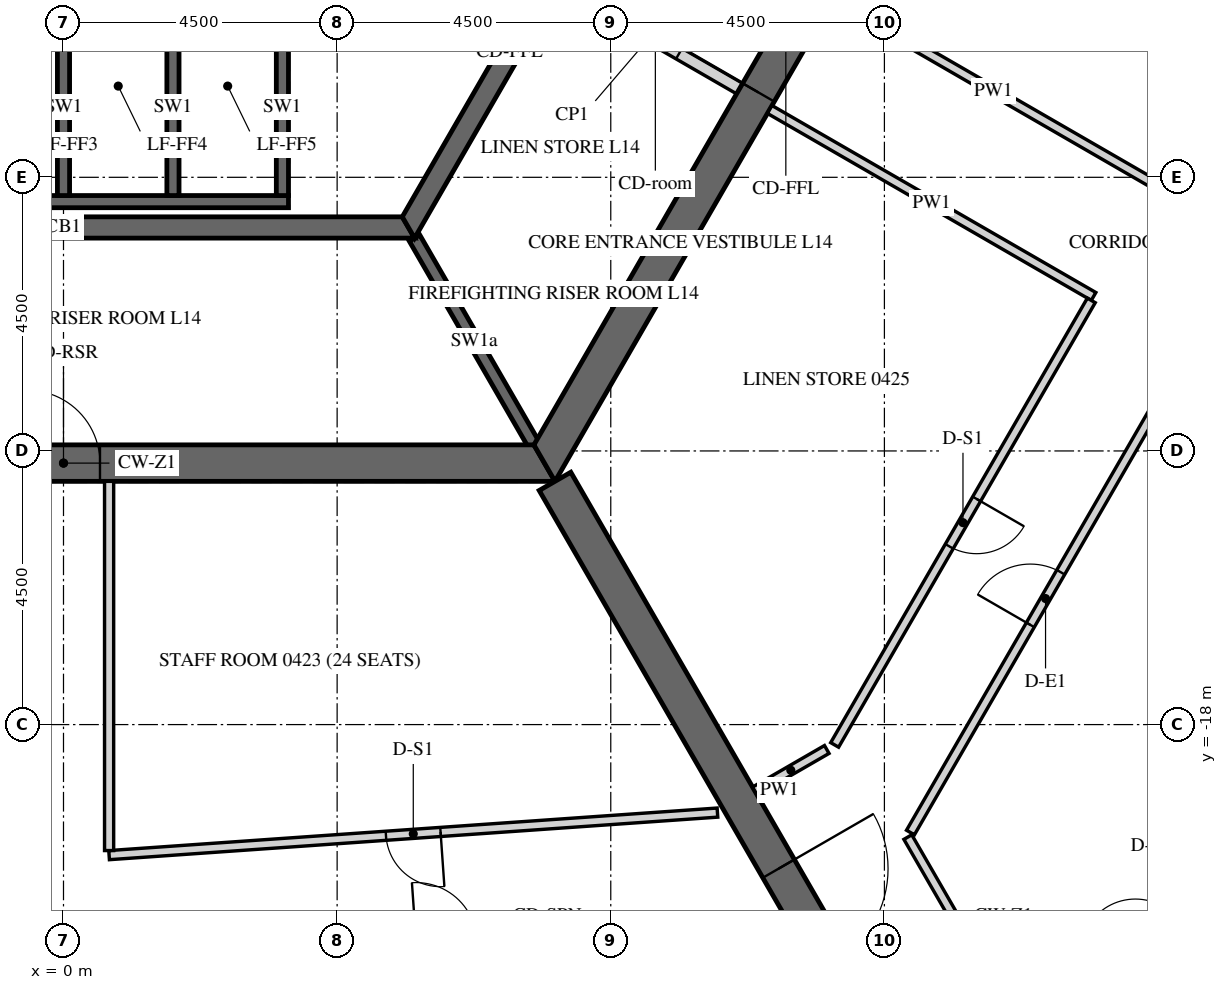
"""IFC4 building model, lengths in metres.
Left out: names, types, materials, properties, quantities, classifications, styles, units other than length and angle.
Written with IfcOpenShell. Run it as: python <this file> out.ifc"""

import sys

from ifc_helpers import new_model, si_unit, direction, frame, frame_2d, origin, place, context, subcontext, project, spatial, polyline, rectangle, outline, extrude, element, fill, save


model = new_model("IFC4")
c1 = context("Model", 3, precision=1e-05, world=origin(), true_north=direction((0.0, 1.0)))
c2 = subcontext(c1, "Body", "Model", "MODEL_VIEW")
j1 = project(units=[si_unit("LENGTHUNIT", "METRE"), si_unit("PLANEANGLEUNIT", "RADIAN")], contexts=[c1])
p1 = place(None, origin())
s1 = spatial("IfcSite", under=j1, at=p1, CompositionType="ELEMENT")
p2 = place(p1, origin())
s2 = spatial("IfcBuilding", under=s1, at=p2, CompositionType="ELEMENT")
p3 = place(p2, frame((0.0, 0.0, 68.7)))
s3 = spatial("IfcBuildingStorey", under=s2, at=p3, CompositionType="ELEMENT", Elevation=68.7)
p4 = place(p3, frame((-7.91, -13.7, -0.15), z_axis=(0.0, 0.0, 1.0), x_axis=(1.0, 0.0, 0.0)))
e1 = element("IfcWall", 1, at=p4, inside=s3, PredefinedType="SHEAR", context=c2, shape_type="SweptSolid", body=[
    extrude(outline(polyline([(-0.173, -0.3), (15.993, -0.3), (15.646, 0.3), (0.173, 0.3), (-0.173, -0.3)])), origin(), (0.0, 0.0, 1.0), 3.9),
])
p5 = place(p4, frame((7.31, 0.0, 0.15)))
e2 = element("IfcOpeningElement", 2, at=p5, cuts=e1, PredefinedType="OPENING", context=c2, shape_type="SweptSolid", body=[
    extrude(rectangle(XDim=1.2, YDim=2.4, at=frame_2d((0.6, 1.2))), frame((0.0, 0.31, 0.0), z_axis=(0.0, -1.0, 0.0), x_axis=(1.0, 0.0, 0.0)), (0.0, 0.0, 1.0), 0.62),
])
p6 = place(p3, frame((7.91, -13.7, -0.15), z_axis=(0.0, 0.0, 1.0), x_axis=(0.499999880136, 0.866025472988, 0.0)))
e3 = element("IfcWall", 3, at=p6, inside=s3, PredefinedType="SHEAR", context=c2, shape_type="SweptSolid", body=[
    extrude(outline(polyline([(-0.173, -0.3), (15.993, -0.3), (15.646, 0.3), (0.173, 0.3), (-0.173, -0.3)])), origin(), (0.0, 0.0, 1.0), 3.9),
])
p7 = place(p6, frame((7.039, 0.0, 0.15)))
e4 = element("IfcOpeningElement", 4, at=p7, cuts=e3, PredefinedType="OPENING", context=c2, shape_type="SweptSolid", body=[
    extrude(rectangle(XDim=1.8, YDim=2.4, at=frame_2d((0.9, 1.2))), frame((0.0, 0.31, 0.0), z_axis=(0.0, -1.0, 0.0), x_axis=(1.0, 0.0, 0.0)), (0.0, 0.0, 1.0), 0.62),
])
p8 = place(p3, frame((8.083, -14.0, -0.15), z_axis=(0.0, 0.0, 1.0), x_axis=(0.499997680643, -0.866026742862, 0.0)))
e5 = element("IfcWall", 5, at=p8, inside=s3, PredefinedType="SHEAR", context=c2, shape_type="SweptSolid", body=[
    extrude(rectangle(XDim=16.509, YDim=0.6, at=frame_2d((8.254, 0.0))), origin(), (0.0, 0.0, 1.0), 3.9),
])
p9 = place(p8, frame((7.354, 0.0, 0.15)))
e6 = element("IfcOpeningElement", 6, at=p9, cuts=e5, PredefinedType="OPENING", context=c2, shape_type="SweptSolid", body=[
    extrude(rectangle(XDim=1.8, YDim=2.4, at=frame_2d((0.9, 1.2))), frame((0.0, 0.31, 0.0), z_axis=(0.0, -1.0, 0.0), x_axis=(1.0, 0.0, 0.0)), (0.0, 0.0, 1.0), 0.62),
])
p10 = place(p3, frame((-5.673, -9.825, -0.15), z_axis=(0.0, 0.0, 1.0), x_axis=(1.0, 0.0, 0.0)))
e7 = element("IfcWall", 7, at=p10, inside=s3, PredefinedType="SHEAR", context=c2, shape_type="SweptSolid", body=[
    extrude(outline(polyline([(-0.101, -0.175), (11.446, -0.175), (11.244, 0.175), (0.101, 0.175), (-0.101, -0.175)])), origin(), (0.0, 0.0, 1.0), 3.9),
])
p11 = place(p3, frame((5.673, -9.825, -0.15), z_axis=(0.0, 0.0, 1.0), x_axis=(0.499995046907, 0.866028263435, 0.0)))
e8 = element("IfcWall", 8, at=p11, inside=s3, PredefinedType="SHEAR", context=c2, shape_type="SweptSolid", body=[
    extrude(outline(polyline([(-0.101, -0.175), (11.446, -0.175), (11.244, 0.175), (0.101, 0.175), (-0.101, -0.175)])), origin(), (0.0, 0.0, 1.0), 3.9),
])
p12 = place(p11, frame((4.801, 0.0, 0.15)))
e9 = element("IfcOpeningElement", 9, at=p12, cuts=e8, PredefinedType="OPENING", context=c2, shape_type="SweptSolid", body=[
    extrude(rectangle(XDim=1.8, YDim=2.4, at=frame_2d((0.9, 1.2))), frame((0.0, 0.185, 0.0), z_axis=(0.0, -1.0, 0.0), x_axis=(1.0, 0.0, 0.0)), (0.0, 0.0, 1.0), 0.37),
])
p13 = place(p3, frame((-5.5, -9.4, -0.25), z_axis=(0.0, 0.0, 1.0), x_axis=(1.0, 0.0, 0.0)))
e10 = element("IfcWall", 10, at=p13, inside=s3, PredefinedType="SHEAR", context=c2, shape_type="SweptSolid", body=[
    extrude(rectangle(XDim=9.2, YDim=0.2, at=frame_2d((4.6, 0.0))), origin(), (0.0, 0.0, 1.0), 3.9),
])
for number, where, z_axis, x_axis in (
    (11, (0.0, -9.3, -0.25), (0.0, 0.0, 1.0), (0.0, 1.0, 0.0)),
    (12, (1.8, -9.3, -0.25), (0.0, 0.0, 1.0), (0.0, 1.0, 0.0)),
    (13, (3.6, -9.3, -0.25), (0.0, 0.0, 1.0), (0.0, 1.0, 0.0)),
):
    element("IfcWall", number, at=place(p3, frame(where, z_axis=z_axis, x_axis=x_axis)), inside=s3, PredefinedType="SHEAR", context=c2, shape_type="SweptSolid", body=[
        extrude(rectangle(XDim=2.9, YDim=0.2, at=frame_2d((1.45, 0.0))), origin(), (0.0, 0.0, 1.0), 3.9),
    ])
p14 = place(p3, frame((5.773, -10.0, -0.15), z_axis=(0.0, 0.0, 1.0), x_axis=(0.500038251005, -0.86600331843, 0.0)))
e14 = element("IfcWall", 14, at=p14, inside=s3, PredefinedType="SHEAR", context=c2, shape_type="SweptSolid", body=[
    extrude(rectangle(XDim=3.926, YDim=0.2, at=frame_2d((1.963, 0.0))), origin(), (0.0, 0.0, 1.0), 3.9),
])
p15 = place(p3, frame((8.175, -5.841, 0.0), z_axis=(0.0, 0.0, 1.0), x_axis=(0.866020560687, -0.500008388397, 0.0)))
e15 = element("IfcWall", 15, at=p15, inside=s3, PredefinedType="PARTITIONING", context=c2, shape_type="SweptSolid", body=[
    extrude(rectangle(XDim=3.4, YDim=0.2, at=frame_2d((1.7, 0.0))), origin(), (0.0, 0.0, 1.0), 3.65),
])
p16 = place(p15, frame((1.35, 0.0, 0.0)))
e16 = element("IfcOpeningElement", 16, at=p16, cuts=e15, PredefinedType="OPENING", context=c2, shape_type="SweptSolid", body=[
    extrude(rectangle(XDim=0.9, YDim=2.1, at=frame_2d((0.45, 1.05))), frame((0.0, 0.11, 0.0), z_axis=(0.0, -1.0, 0.0), x_axis=(1.0, 0.0, 0.0)), (0.0, 0.0, 1.0), 0.22),
])
p17 = place(p3, frame((10.754, -19.447, 0.0), z_axis=(0.0, 0.0, 1.0), x_axis=(-0.997564830966, -0.069745308232, 0.0)))
e17 = element("IfcWall", 17, at=p17, inside=s3, PredefinedType="PARTITIONING", context=c2, shape_type="SweptSolid", body=[
    extrude(rectangle(XDim=10.029, YDim=0.15, at=frame_2d((5.014, 0.0))), origin(), (0.0, 0.0, 1.0), 2.988),
])
p18 = place(p17, frame((4.564, 0.0, 0.0)))
e18 = element("IfcOpeningElement", 18, at=p18, cuts=e17, PredefinedType="OPENING", context=c2, shape_type="SweptSolid", body=[
    extrude(rectangle(XDim=0.9, YDim=2.1, at=frame_2d((0.45, 1.05))), frame((0.0, 0.085, 0.0), z_axis=(0.0, -1.0, 0.0), x_axis=(1.0, 0.0, 0.0)), (0.0, 0.0, 1.0), 0.17),
])
p19 = place(p3, frame((0.75, -20.072, 0.0), z_axis=(0.0, 0.0, 1.0), x_axis=(0.0, 1.0, 0.0)))
e19 = element("IfcWall", 19, at=p19, inside=s3, PredefinedType="PARTITIONING", context=c2, shape_type="SweptSolid", body=[
    extrude(rectangle(XDim=6.072, YDim=0.15, at=frame_2d((3.036, 0.0))), origin(), (0.0, 0.0, 1.0), 2.988),
])
p20 = place(p3, frame((15.441, -22.545, 0.0), z_axis=(0.0, 0.0, 1.0), x_axis=(-0.500037089193, 0.86600398927, 0.0)))
e20 = element("IfcWall", 20, at=p20, inside=s3, PredefinedType="PARTITIONING", context=c2, shape_type="SweptSolid", body=[
    extrude(rectangle(XDim=3.112, YDim=0.15, at=frame_2d((1.556, 0.0))), origin(), (0.0, 0.0, 1.0), 2.988),
])
p21 = place(p3, frame((13.928, -19.775, 0.0), z_axis=(0.0, 0.0, 1.0), x_axis=(0.50000450071, 0.866022805283, 0.0)))
e21 = element("IfcWall", 21, at=p21, inside=s3, PredefinedType="PARTITIONING", context=c2, shape_type="SweptSolid", body=[
    extrude(rectangle(XDim=23.877, YDim=0.15, at=frame_2d((11.938, 0.0))), origin(), (0.0, 0.0, 1.0), 2.988),
])
p22 = place(p21, frame((3.943, 0.0, 0.0)))
e22 = element("IfcOpeningElement", 22, at=p22, cuts=e21, PredefinedType="OPENING", context=c2, shape_type="SweptSolid", body=[
    extrude(rectangle(XDim=1.0, YDim=2.1, at=frame_2d((0.5, 1.05))), frame((0.0, 0.085, 0.0), z_axis=(0.0, -1.0, 0.0), x_axis=(1.0, 0.0, 0.0)), (0.0, 0.0, 1.0), 0.17),
])
p23 = place(p21, frame((14.972, 0.0, 0.0)))
e23 = element("IfcOpeningElement", 23, at=p23, cuts=e21, PredefinedType="OPENING", context=c2, shape_type="SweptSolid", body=[
    extrude(rectangle(XDim=1.0, YDim=2.1, at=frame_2d((0.5, 1.05))), frame((0.0, 0.085, 0.0), z_axis=(0.0, -1.0, 0.0), x_axis=(1.0, 0.0, 0.0)), (0.0, 0.0, 1.0), 0.17),
])
p24 = place(p3, frame((17.925, -9.103, 0.0), z_axis=(0.0, 0.0, 1.0), x_axis=(-0.866013586754, 0.500020467139, 0.0)))
e24 = element("IfcWall", 24, at=p24, inside=s3, PredefinedType="PARTITIONING", context=c2, shape_type="SweptSolid", body=[
    extrude(rectangle(XDim=6.075, YDim=0.15, at=frame_2d((3.038, 0.0))), origin(), (0.0, 0.0, 1.0), 2.988),
])
p25 = place(p3, frame((11.614, -7.884, 0.0), z_axis=(0.0, 0.0, 1.0), x_axis=(0.866033542371, -0.499985903289, 0.0)))
e25 = element("IfcWall", 25, at=p25, inside=s3, PredefinedType="PARTITIONING", context=c2, shape_type="SweptSolid", body=[
    extrude(rectangle(XDim=6.15, YDim=0.15, at=frame_2d((3.075, 0.0))), origin(), (0.0, 0.0, 1.0), 2.988),
])
p26 = place(p3, frame((16.902, -11.024, 0.0), z_axis=(0.0, 0.0, 1.0), x_axis=(-0.499999527968, -0.866025676312, 0.0)))
e26 = element("IfcWall", 26, at=p26, inside=s3, PredefinedType="PARTITIONING", context=c2, shape_type="SweptSolid", body=[
    extrude(rectangle(XDim=8.441, YDim=0.15, at=frame_2d((4.22, 0.0))), origin(), (0.0, 0.0, 1.0), 2.988),
])
p27 = place(p26, frame((3.771, 0.0, 0.0)))
e27 = element("IfcOpeningElement", 27, at=p27, cuts=e26, PredefinedType="OPENING", context=c2, shape_type="SweptSolid", body=[
    extrude(rectangle(XDim=0.9, YDim=2.1, at=frame_2d((0.45, 1.05))), frame((0.0, 0.085, 0.0), z_axis=(0.0, -1.0, 0.0), x_axis=(1.0, 0.0, 0.0)), (0.0, 0.0, 1.0), 0.17),
])
p28 = place(p3, frame((12.552, -18.409, 0.0), z_axis=(0.0, 0.0, 1.0), x_axis=(-0.866078408764, -0.499908181442, 0.0)))
e28 = element("IfcWall", 28, at=p28, inside=s3, PredefinedType="PARTITIONING", context=c2, shape_type="SweptSolid", body=[
    extrude(rectangle(XDim=1.365, YDim=0.15, at=frame_2d((0.683, 0.0))), origin(), (0.0, 0.0, 1.0), 2.988),
])
p29 = place(p3, frame((15.271, -25.85, 0.0), z_axis=(0.0, 0.0, 1.0), x_axis=(0.499983733712, 0.866034794927, 0.0)))
e29 = element("IfcWall", 29, at=p29, inside=s3, PredefinedType="PARTITIONING", context=c2, shape_type="SweptSolid", body=[
    extrude(rectangle(XDim=8.762, YDim=0.1, at=frame_2d((4.381, 0.0))), origin(), (0.0, 0.0, 1.0), 2.988),
])
p30 = place(p29, frame((4.712, 0.0, 0.0)))
e30 = element("IfcOpeningElement", 30, at=p30, cuts=e29, PredefinedType="OPENING", context=c2, shape_type="SweptSolid", body=[
    extrude(rectangle(XDim=0.9, YDim=2.1, at=frame_2d((0.45, 1.05))), frame((0.0, 0.06, 0.0), z_axis=(0.0, -1.0, 0.0), x_axis=(1.0, 0.0, 0.0)), (0.0, 0.0, 1.0), 0.12),
])
p31 = place(p7, origin())
e31 = element("IfcDoor", 31, at=p31, inside=s3, OperationType="DOUBLE_DOOR_SINGLE_SWING", PredefinedType="DOOR", context=c2, shape_type="SweptSolid", body=[
    extrude(rectangle(XDim=1.8, YDim=2.4, at=frame_2d((0.9, 1.2))), frame((0.0, 0.025, 0.0), z_axis=(0.0, -1.0, 0.0), x_axis=(1.0, 0.0, 0.0)), (0.0, 0.0, 1.0), 0.05),
])
fill(e4, e31)
p32 = place(p5, origin())
e32 = element("IfcDoor", 32, at=p32, inside=s3, OperationType="SINGLE_SWING_LEFT", PredefinedType="DOOR", context=c2, shape_type="SweptSolid", body=[
    extrude(rectangle(XDim=1.2, YDim=2.4, at=frame_2d((0.6, 1.2))), frame((0.0, 0.025, 0.0), z_axis=(0.0, -1.0, 0.0), x_axis=(1.0, 0.0, 0.0)), (0.0, 0.0, 1.0), 0.05),
])
fill(e2, e32)
p33 = place(p9, origin())
e33 = element("IfcDoor", 33, at=p33, inside=s3, OperationType="DOUBLE_DOOR_SINGLE_SWING", PredefinedType="DOOR", context=c2, shape_type="SweptSolid", body=[
    extrude(rectangle(XDim=1.8, YDim=2.4, at=frame_2d((0.9, 1.2))), frame((0.0, 0.025, 0.0), z_axis=(0.0, -1.0, 0.0), x_axis=(1.0, 0.0, 0.0)), (0.0, 0.0, 1.0), 0.05),
])
fill(e6, e33)
p34 = place(p16, origin())
e34 = element("IfcDoor", 34, at=p34, inside=s3, OperationType="SINGLE_SWING_LEFT", PredefinedType="DOOR", context=c2, shape_type="SweptSolid", body=[
    extrude(rectangle(XDim=0.9, YDim=2.1, at=frame_2d((0.45, 1.05))), frame((0.0, 0.025, 0.0), z_axis=(0.0, -1.0, 0.0), x_axis=(1.0, 0.0, 0.0)), (0.0, 0.0, 1.0), 0.05),
])
fill(e16, e34)
p35 = place(p22, origin())
e35 = element("IfcDoor", 35, at=p35, inside=s3, OperationType="SINGLE_SWING_RIGHT", PredefinedType="DOOR", context=c2, shape_type="SweptSolid", body=[
    extrude(rectangle(XDim=1.0, YDim=2.1, at=frame_2d((0.5, 1.05))), frame((0.0, 0.025, 0.0), z_axis=(0.0, -1.0, 0.0), x_axis=(1.0, 0.0, 0.0)), (0.0, 0.0, 1.0), 0.05),
])
fill(e22, e35)
p36 = place(p30, origin())
e36 = element("IfcDoor", 36, at=p36, inside=s3, OperationType="SINGLE_SWING_LEFT", PredefinedType="DOOR", context=c2, shape_type="SweptSolid", body=[
    extrude(rectangle(XDim=0.9, YDim=2.1, at=frame_2d((0.45, 1.05))), frame((0.0, 0.025, 0.0), z_axis=(0.0, -1.0, 0.0), x_axis=(1.0, 0.0, 0.0)), (0.0, 0.0, 1.0), 0.05),
])
fill(e30, e36)
p37 = place(p18, origin())
e37 = element("IfcDoor", 37, at=p37, inside=s3, OperationType="SINGLE_SWING_LEFT", PredefinedType="DOOR", context=c2, shape_type="SweptSolid", body=[
    extrude(rectangle(XDim=0.9, YDim=2.1, at=frame_2d((0.45, 1.05))), frame((0.0, 0.025, 0.0), z_axis=(0.0, -1.0, 0.0), x_axis=(1.0, 0.0, 0.0)), (0.0, 0.0, 1.0), 0.05),
])
fill(e18, e37)
p38 = place(p27, origin())
e38 = element("IfcDoor", 38, at=p38, inside=s3, OperationType="SINGLE_SWING_RIGHT", PredefinedType="DOOR", context=c2, shape_type="SweptSolid", body=[
    extrude(rectangle(XDim=0.9, YDim=2.1, at=frame_2d((0.45, 1.05))), frame((0.0, 0.025, 0.0), z_axis=(0.0, -1.0, 0.0), x_axis=(1.0, 0.0, 0.0)), (0.0, 0.0, 1.0), 0.05),
])
fill(e27, e38)
save(model, sys.argv[1])
